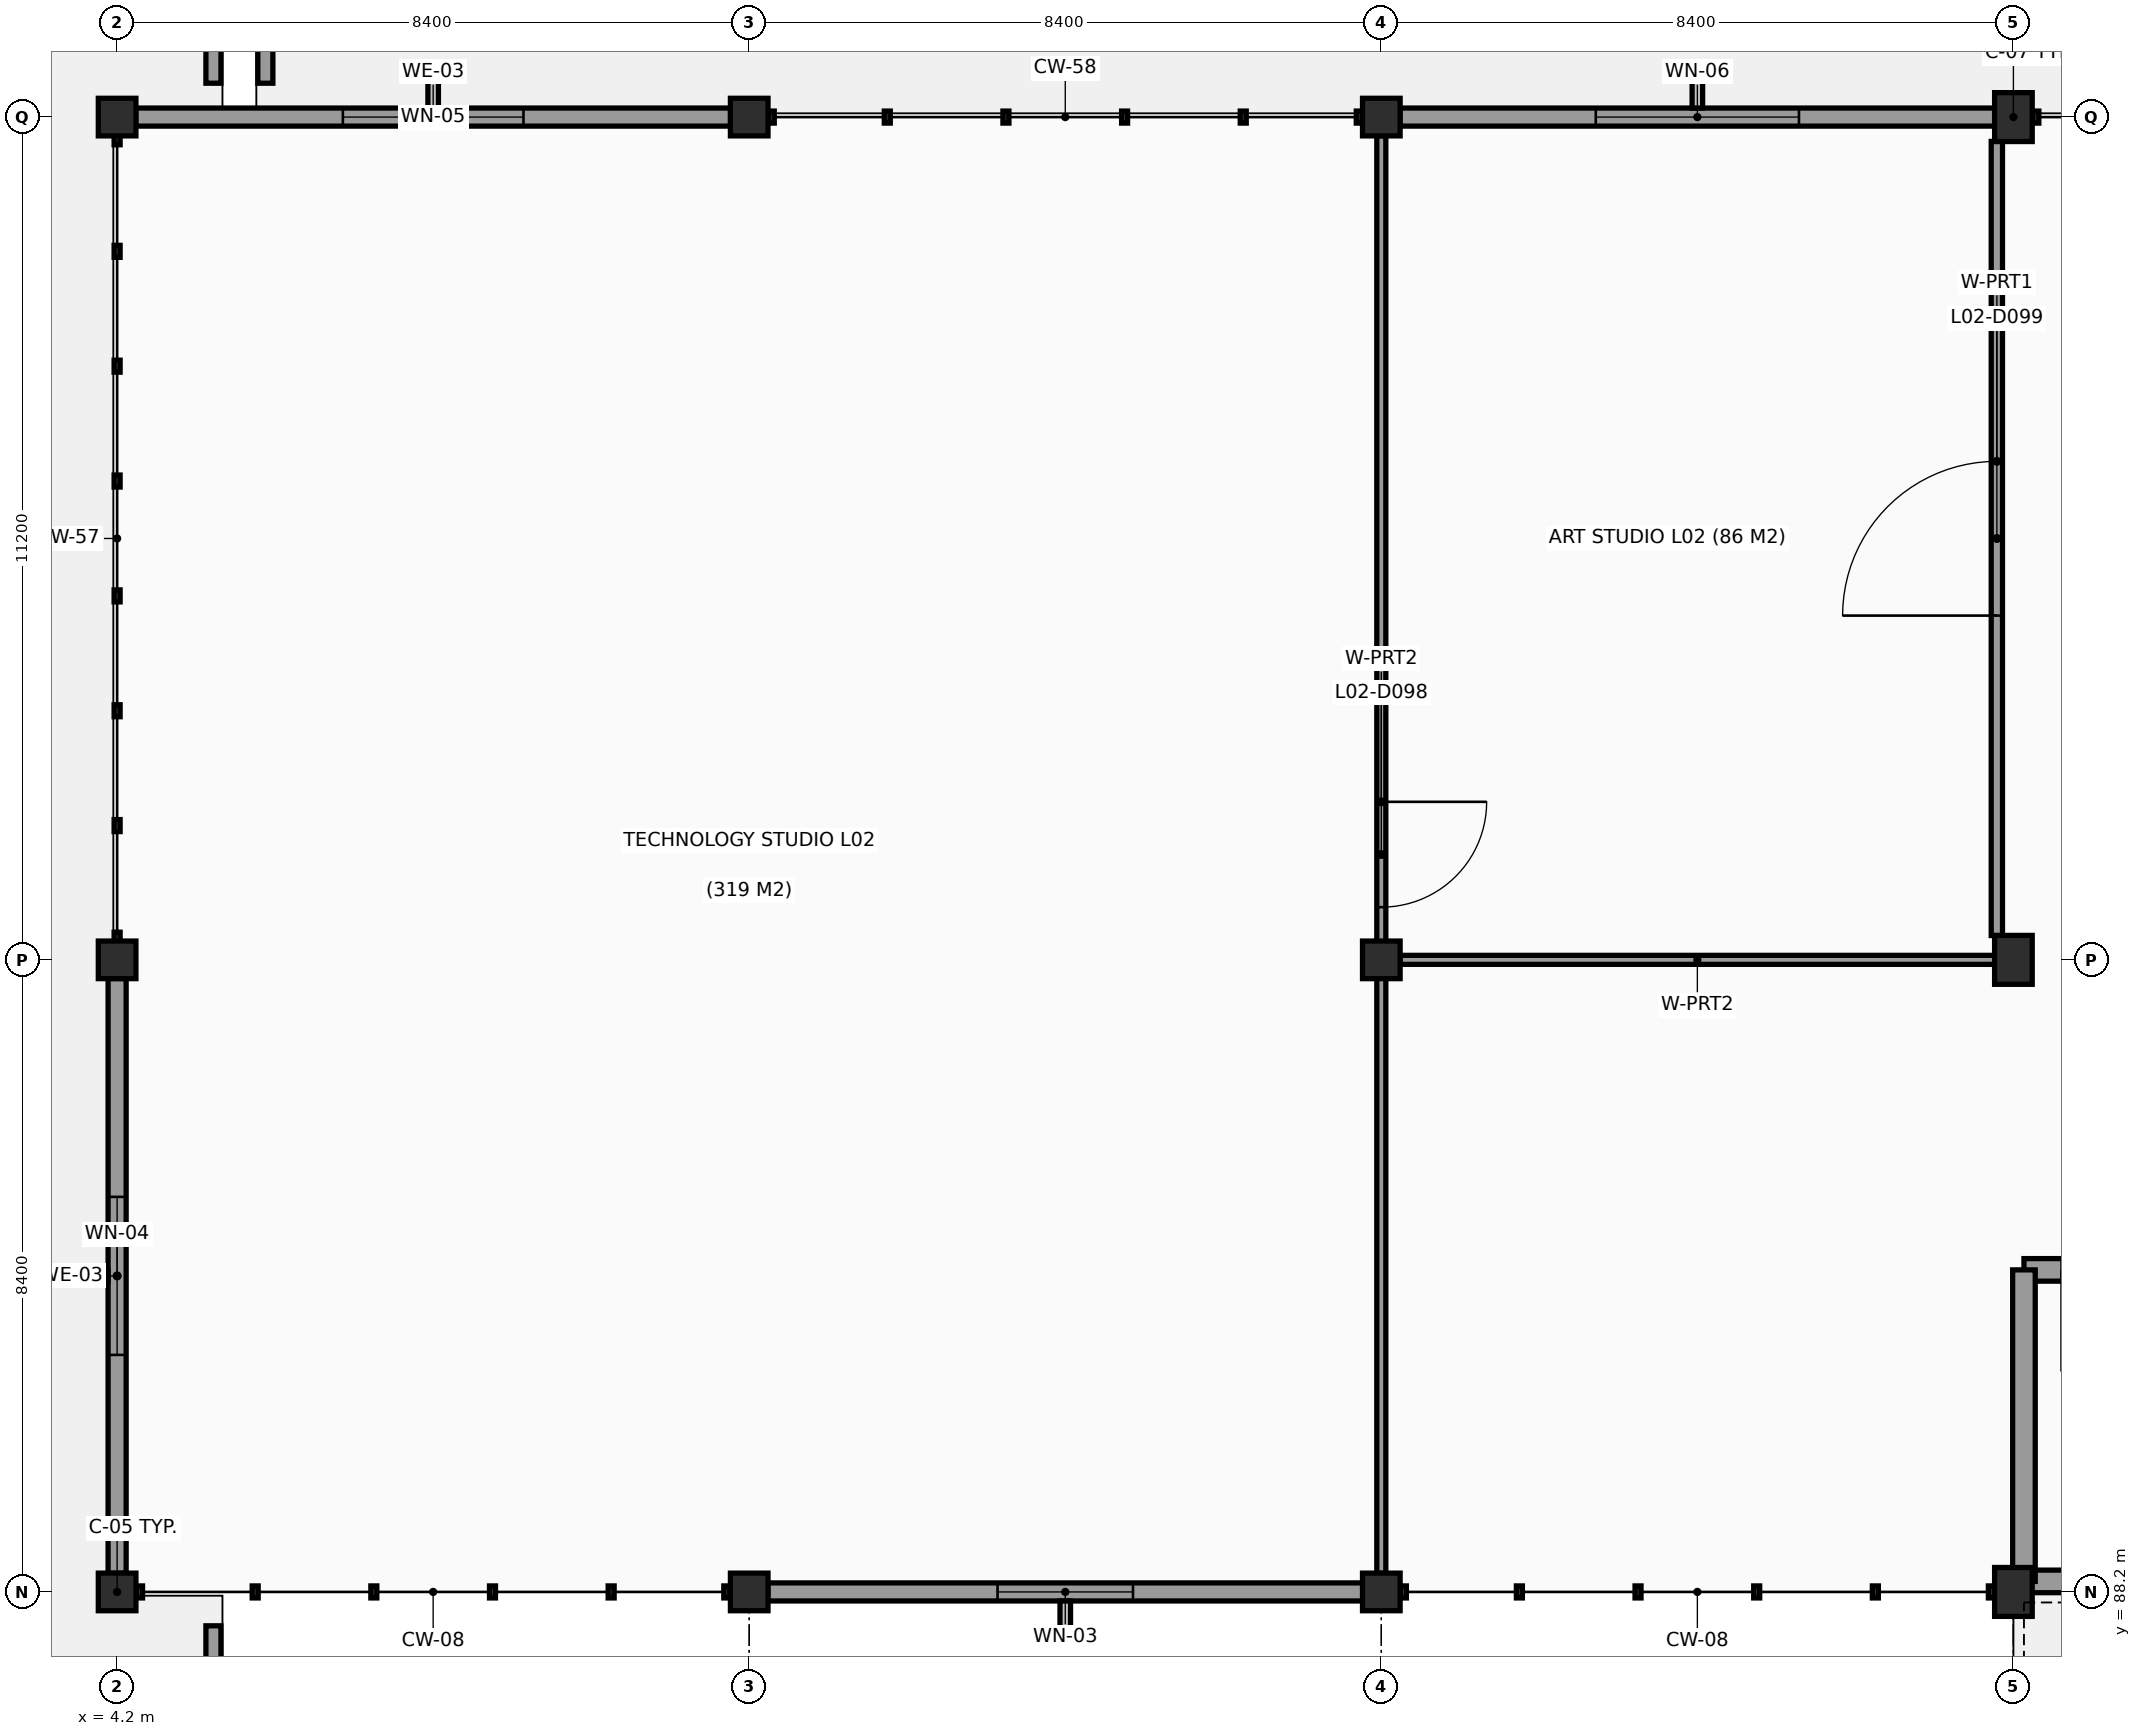
"""IFC4 building model, lengths in metres.
Left out: names, types, materials, properties, quantities, classifications, styles, units other than length and angle.
Written with IfcOpenShell. Run it as: python <this file> out.ifc"""

import sys

from ifc_helpers import new_model, si_unit, direction, frame, frame_2d, origin, origin_2d, place, context, subcontext, project, spatial, rectangle, extrude, element, fill, save


model = new_model("IFC4")
c1 = context("Model", 3, precision=1e-05, world=origin(), true_north=direction((0.0, 1.0)))
c2 = subcontext(c1, "Body", "Model", "MODEL_VIEW")
j1 = project(units=[si_unit("LENGTHUNIT", "METRE"), si_unit("PLANEANGLEUNIT", "RADIAN")], contexts=[c1])
p1 = place(None, origin())
s1 = spatial("IfcSite", under=j1, at=p1, CompositionType="ELEMENT")
p2 = place(p1, origin())
s2 = spatial("IfcBuilding", under=s1, at=p2, CompositionType="ELEMENT")
p3 = place(p2, frame((0.0, 0.0, 7.8)))
s3 = spatial("IfcBuildingStorey", under=s2, at=p3, CompositionType="ELEMENT", Elevation=7.8)
for number, where, z_axis, x_axis in (
    (1, (4.2, 88.2, 0.0), (0.0, 0.0, 1.0), (1.0, 0.0, 0.0)),
    (2, (4.2, 96.6, 0.0), (0.0, 0.0, 1.0), (1.0, 0.0, 0.0)),
):
    element("IfcColumn", number, at=place(p3, frame(where, z_axis=z_axis, x_axis=x_axis)), inside=s3, PredefinedType="COLUMN", context=c2, shape_type="SweptSolid", body=[
        extrude(rectangle(XDim=0.5, YDim=0.5, at=origin_2d()), origin(), (0.0, 0.0, 1.0), 3.34),
    ])
p4 = place(p3, frame((4.2, 107.8, 0.0), z_axis=(0.0, 0.0, 1.0), x_axis=(1.0, 0.0, 0.0)))
e3 = element("IfcColumn", 3, at=p4, inside=s3, PredefinedType="COLUMN", context=c2, shape_type="SweptSolid", body=[
    extrude(rectangle(XDim=0.5, YDim=0.5, at=origin_2d()), origin(), (0.0, 0.0, 1.0), 3.75),
])
p5 = place(p3, frame((12.6, 88.2, 0.0), z_axis=(0.0, 0.0, 1.0), x_axis=(1.0, 0.0, 0.0)))
e4 = element("IfcColumn", 4, at=p5, inside=s3, PredefinedType="COLUMN", context=c2, shape_type="SweptSolid", body=[
    extrude(rectangle(XDim=0.5, YDim=0.5, at=origin_2d()), origin(), (0.0, 0.0, 1.0), 3.34),
])
p6 = place(p3, frame((12.6, 107.8, 0.0), z_axis=(0.0, 0.0, 1.0), x_axis=(1.0, 0.0, 0.0)))
e5 = element("IfcColumn", 5, at=p6, inside=s3, PredefinedType="COLUMN", context=c2, shape_type="SweptSolid", body=[
    extrude(rectangle(XDim=0.5, YDim=0.5, at=origin_2d()), origin(), (0.0, 0.0, 1.0), 3.75),
])
for number, where, z_axis, x_axis in (
    (6, (21.0, 88.2, 0.0), (0.0, 0.0, 1.0), (1.0, 0.0, 0.0)),
    (7, (21.0, 96.6, 0.0), (0.0, 0.0, 1.0), (1.0, 0.0, 0.0)),
):
    element("IfcColumn", number, at=place(p3, frame(where, z_axis=z_axis, x_axis=x_axis)), inside=s3, PredefinedType="COLUMN", context=c2, shape_type="SweptSolid", body=[
        extrude(rectangle(XDim=0.5, YDim=0.5, at=origin_2d()), origin(), (0.0, 0.0, 1.0), 3.34),
    ])
p7 = place(p3, frame((21.0, 107.8, 0.0), z_axis=(0.0, 0.0, 1.0), x_axis=(1.0, 0.0, 0.0)))
e8 = element("IfcColumn", 8, at=p7, inside=s3, PredefinedType="COLUMN", context=c2, shape_type="SweptSolid", body=[
    extrude(rectangle(XDim=0.5, YDim=0.5, at=origin_2d()), origin(), (0.0, 0.0, 1.0), 3.75),
])
for number, where, z_axis, x_axis in (
    (9, (29.4, 88.2, 0.0), (0.0, 0.0, 1.0), (1.0, 0.0, 0.0)),
    (10, (29.4, 96.6, 0.0), (0.0, 0.0, 1.0), (1.0, 0.0, 0.0)),
):
    element("IfcColumn", number, at=place(p3, frame(where, z_axis=z_axis, x_axis=x_axis)), inside=s3, PredefinedType="COLUMN", context=c2, shape_type="SweptSolid", body=[
        extrude(rectangle(XDim=0.5, YDim=0.65, at=origin_2d()), origin(), (0.0, 0.0, 1.0), 3.34),
    ])
p8 = place(p3, frame((29.4, 107.8, 0.0), z_axis=(0.0, 0.0, 1.0), x_axis=(1.0, 0.0, 0.0)))
e11 = element("IfcColumn", 11, at=p8, inside=s3, PredefinedType="COLUMN", context=c2, shape_type="SweptSolid", body=[
    extrude(rectangle(XDim=0.5, YDim=0.65, at=origin_2d()), origin(), (0.0, 0.0, 1.0), 3.75),
])
p9 = place(p3, frame((20.752, 88.2, 0.0), z_axis=(0.0, 0.0, 1.0), x_axis=(-1.0, 0.0, 0.0)))
e12 = element("IfcWall", 12, at=p9, inside=s3, PredefinedType="SOLIDWALL", context=c2, shape_type="SweptSolid", body=[
    extrude(rectangle(XDim=7.904, YDim=0.24, at=frame_2d((3.952, 0.0))), origin(), (0.0, 0.0, 1.0), 3.2),
])
p10 = place(p9, frame((3.052, 0.0, 0.95)))
e13 = element("IfcOpeningElement", 13, at=p10, cuts=e12, PredefinedType="OPENING", context=c2, shape_type="SweptSolid", body=[
    extrude(rectangle(XDim=1.8, YDim=1.2, at=frame_2d((0.9, 0.6))), frame((0.0, 0.13, 0.0), z_axis=(0.0, -1.0, 0.0), x_axis=(1.0, 0.0, 0.0)), (0.0, 0.0, 1.0), 0.26),
])
p11 = place(p3, frame((4.2, 88.448, 0.0), z_axis=(0.0, 0.0, 1.0), x_axis=(0.0, 1.0, 0.0)))
e14 = element("IfcWall", 14, at=p11, inside=s3, PredefinedType="SOLIDWALL", context=c2, shape_type="SweptSolid", body=[
    extrude(rectangle(XDim=7.904, YDim=0.24, at=frame_2d((3.952, 0.0))), origin(), (0.0, 0.0, 1.0), 3.2),
])
p12 = place(p11, frame((2.902, 0.0, 0.95)))
e15 = element("IfcOpeningElement", 15, at=p12, cuts=e14, PredefinedType="OPENING", context=c2, shape_type="SweptSolid", body=[
    extrude(rectangle(XDim=2.1, YDim=1.2, at=frame_2d((1.05, 0.6))), frame((0.0, 0.13, 0.0), z_axis=(0.0, -1.0, 0.0), x_axis=(1.0, 0.0, 0.0)), (0.0, 0.0, 1.0), 0.26),
])
p13 = place(p3, frame((4.448, 107.8, 0.0), z_axis=(0.0, 0.0, 1.0), x_axis=(1.0, 0.0, 0.0)))
e16 = element("IfcWall", 16, at=p13, inside=s3, PredefinedType="SOLIDWALL", context=c2, shape_type="SweptSolid", body=[
    extrude(rectangle(XDim=7.904, YDim=0.24, at=frame_2d((3.952, 0.0))), origin(), (0.0, 0.0, 1.0), 3.34),
])
p14 = place(p13, frame((2.752, 0.0, 0.95)))
e17 = element("IfcOpeningElement", 17, at=p14, cuts=e16, PredefinedType="OPENING", context=c2, shape_type="SweptSolid", body=[
    extrude(rectangle(XDim=2.4, YDim=1.2, at=frame_2d((1.2, 0.6))), frame((0.0, 0.13, 0.0), z_axis=(0.0, -1.0, 0.0), x_axis=(1.0, 0.0, 0.0)), (0.0, 0.0, 1.0), 0.26),
])
p15 = place(p3, frame((21.248, 107.8, 0.0), z_axis=(0.0, 0.0, 1.0), x_axis=(1.0, 0.0, 0.0)))
e18 = element("IfcWall", 18, at=p15, inside=s3, PredefinedType="SOLIDWALL", context=c2, shape_type="SweptSolid", body=[
    extrude(rectangle(XDim=7.904, YDim=0.24, at=frame_2d((3.952, 0.0))), origin(), (0.0, 0.0, 1.0), 3.34),
])
p16 = place(p15, frame((2.602, 0.0, 0.95)))
e19 = element("IfcOpeningElement", 19, at=p16, cuts=e18, PredefinedType="OPENING", context=c2, shape_type="SweptSolid", body=[
    extrude(rectangle(XDim=2.7, YDim=1.2, at=frame_2d((1.35, 0.6))), frame((0.0, 0.13, 0.0), z_axis=(0.0, -1.0, 0.0), x_axis=(1.0, 0.0, 0.0)), (0.0, 0.0, 1.0), 0.26),
])
for number, where, z_axis, x_axis in (
    (20, (6.17, 108.25, 0.0), (0.0, 0.0, 1.0), (0.0, 1.0, 0.0)),
    (21, (5.48, 111.88, 0.0), (0.0, 0.0, 1.0), (0.0, -1.0, 0.0)),
):
    element("IfcWall", number, at=place(p3, frame(where, z_axis=z_axis, x_axis=x_axis)), inside=s3, PredefinedType="PARAPET", context=c2, shape_type="SweptSolid", body=[
        extrude(rectangle(XDim=3.63, YDim=0.2, at=frame_2d((1.815, 0.0))), origin(), (0.0, 0.0, 1.0), 1.1),
    ])
p17 = place(p3, frame((5.48, 87.75, 0.0), z_axis=(0.0, 0.0, 1.0), x_axis=(0.0, -1.0, 0.0)))
e22 = element("IfcWall", 22, at=p17, inside=s3, PredefinedType="PARAPET", context=c2, shape_type="SweptSolid", body=[
    extrude(rectangle(XDim=66.3, YDim=0.2, at=frame_2d((33.15, 0.0))), origin(), (0.0, 0.0, 1.0), 1.1),
])
p18 = place(p3, frame((29.54, 88.34, 0.0), z_axis=(0.0, 0.0, 1.0), x_axis=(1.0, 0.0, 0.0)))
e23 = element("IfcWall", 23, at=p18, inside=s3, PredefinedType="SHEAR", context=c2, shape_type="SweptSolid", body=[
    extrude(rectangle(XDim=8.12, YDim=0.3, at=frame_2d((4.06, 0.0))), origin(), (0.0, 0.0, 1.0), 3.34),
])
p19 = place(p3, frame((37.66, 92.48, 0.0), z_axis=(0.0, 0.0, 1.0), x_axis=(-1.0, 0.0, 0.0)))
e24 = element("IfcWall", 24, at=p19, inside=s3, PredefinedType="SHEAR", context=c2, shape_type="SweptSolid", body=[
    extrude(rectangle(XDim=8.12, YDim=0.3, at=frame_2d((4.06, 0.0))), origin(), (0.0, 0.0, 1.0), 3.34),
])
p20 = place(p19, frame((6.27, 0.0, 0.0)))
e25 = element("IfcOpeningElement", 25, at=p20, cuts=e24, PredefinedType="OPENING", context=c2, shape_type="SweptSolid", body=[
    extrude(rectangle(XDim=1.35, YDim=2.15, at=frame_2d((0.675, 1.075))), frame((0.0, 0.16, 0.0), z_axis=(0.0, -1.0, 0.0), x_axis=(1.0, 0.0, 0.0)), (0.0, 0.0, 1.0), 0.32),
])
p21 = place(p3, frame((29.54, 92.48, 0.0), z_axis=(0.0, 0.0, 1.0), x_axis=(0.0, -1.0, 0.0)))
e26 = element("IfcWall", 26, at=p21, inside=s3, PredefinedType="SHEAR", context=c2, shape_type="SweptSolid", body=[
    extrude(rectangle(XDim=4.14, YDim=0.3, at=frame_2d((2.07, 0.0))), origin(), (0.0, 0.0, 1.0), 3.34),
])
p22 = place(p3, frame((21.0, 107.552, 0.0), z_axis=(0.0, 0.0, 1.0), x_axis=(0.0, -1.0, 0.0)))
e27 = element("IfcWall", 27, at=p22, inside=s3, PredefinedType="PARTITIONING", context=c2, shape_type="SweptSolid", body=[
    extrude(rectangle(XDim=19.104, YDim=0.12, at=frame_2d((9.552, 0.0))), origin(), (0.0, 0.0, 1.0), 3.34),
])
p23 = place(p22, frame((8.852, 0.0, 0.0)))
e28 = element("IfcOpeningElement", 28, at=p23, cuts=e27, PredefinedType="OPENING", context=c2, shape_type="SweptSolid", body=[
    extrude(rectangle(XDim=1.4, YDim=2.2, at=frame_2d((0.7, 1.1))), frame((0.0, 0.07, 0.0), z_axis=(0.0, -1.0, 0.0), x_axis=(1.0, 0.0, 0.0)), (0.0, 0.0, 1.0), 0.14),
])
p24 = place(p3, frame((29.18, 107.477, 0.0), z_axis=(0.0, 0.0, 1.0), x_axis=(0.0, -1.0, 0.0)))
e29 = element("IfcWall", 29, at=p24, inside=s3, PredefinedType="PARTITIONING", context=c2, shape_type="SweptSolid", body=[
    extrude(rectangle(XDim=10.554, YDim=0.15, at=frame_2d((5.277, 0.0))), origin(), (0.0, 0.0, 1.0), 3.34),
])
p25 = place(p24, frame((4.252, 0.0, 0.0)))
e30 = element("IfcOpeningElement", 30, at=p25, cuts=e29, PredefinedType="OPENING", context=c2, shape_type="SweptSolid", body=[
    extrude(rectangle(XDim=2.05, YDim=2.35, at=frame_2d((1.025, 1.175))), frame((0.0, 0.085, 0.0), z_axis=(0.0, -1.0, 0.0), x_axis=(1.0, 0.0, 0.0)), (0.0, 0.0, 1.0), 0.17),
])
p26 = place(p3, frame((29.152, 96.6, 0.0), z_axis=(0.0, 0.0, 1.0), x_axis=(-1.0, 0.0, 0.0)))
e31 = element("IfcWall", 31, at=p26, inside=s3, PredefinedType="PARTITIONING", context=c2, shape_type="SweptSolid", body=[
    extrude(rectangle(XDim=7.904, YDim=0.12, at=frame_2d((3.952, 0.0))), origin(), (0.0, 0.0, 1.0), 3.34),
])
p27 = place(p10, origin())
e32 = element("IfcWindow", 32, at=p27, inside=s3, PartitioningType="SINGLE_PANEL", PredefinedType="WINDOW", context=c2, shape_type="SweptSolid", body=[
    extrude(rectangle(XDim=1.8, YDim=1.2, at=frame_2d((0.9, 0.6))), frame((0.0, 0.03, 0.0), z_axis=(0.0, -1.0, 0.0), x_axis=(1.0, 0.0, 0.0)), (0.0, 0.0, 1.0), 0.06),
])
fill(e13, e32)
p28 = place(p12, origin())
e33 = element("IfcWindow", 33, at=p28, inside=s3, PartitioningType="SINGLE_PANEL", PredefinedType="WINDOW", context=c2, shape_type="SweptSolid", body=[
    extrude(rectangle(XDim=2.1, YDim=1.2, at=frame_2d((1.05, 0.6))), frame((0.0, 0.03, 0.0), z_axis=(0.0, -1.0, 0.0), x_axis=(1.0, 0.0, 0.0)), (0.0, 0.0, 1.0), 0.06),
])
fill(e15, e33)
p29 = place(p14, origin())
e34 = element("IfcWindow", 34, at=p29, inside=s3, PartitioningType="SINGLE_PANEL", PredefinedType="WINDOW", context=c2, shape_type="SweptSolid", body=[
    extrude(rectangle(XDim=2.4, YDim=1.2, at=frame_2d((1.2, 0.6))), frame((0.0, 0.03, 0.0), z_axis=(0.0, -1.0, 0.0), x_axis=(1.0, 0.0, 0.0)), (0.0, 0.0, 1.0), 0.06),
])
fill(e17, e34)
p30 = place(p16, origin())
e35 = element("IfcWindow", 35, at=p30, inside=s3, PartitioningType="SINGLE_PANEL", PredefinedType="WINDOW", context=c2, shape_type="SweptSolid", body=[
    extrude(rectangle(XDim=2.7, YDim=1.2, at=frame_2d((1.35, 0.6))), frame((0.0, 0.03, 0.0), z_axis=(0.0, -1.0, 0.0), x_axis=(1.0, 0.0, 0.0)), (0.0, 0.0, 1.0), 0.06),
])
fill(e19, e35)
p31 = place(p20, frame((1.35, 0.0, 0.0), z_axis=(0.0, 0.0, 1.0), x_axis=(-1.0, 0.0, 0.0)))
e36 = element("IfcDoor", 36, at=p31, inside=s3, OperationType="SINGLE_SWING_RIGHT", PredefinedType="DOOR", context=c2, shape_type="SweptSolid", body=[
    extrude(rectangle(XDim=1.35, YDim=2.15, at=frame_2d((0.675, 1.075))), frame((0.0, 0.025, 0.0), z_axis=(0.0, -1.0, 0.0), x_axis=(1.0, 0.0, 0.0)), (0.0, 0.0, 1.0), 0.05),
])
fill(e25, e36)
p32 = place(p23, origin())
e37 = element("IfcDoor", 37, at=p32, inside=s3, OperationType="SINGLE_SWING_LEFT", PredefinedType="DOOR", context=c2, shape_type="SweptSolid", body=[
    extrude(rectangle(XDim=1.4, YDim=2.2, at=frame_2d((0.7, 1.1))), frame((0.0, 0.025, 0.0), z_axis=(0.0, -1.0, 0.0), x_axis=(1.0, 0.0, 0.0)), (0.0, 0.0, 1.0), 0.05),
])
fill(e28, e37)
p33 = place(p25, origin())
e38 = element("IfcDoor", 38, at=p33, inside=s3, OperationType="DOUBLE_DOOR_SINGLE_SWING", PredefinedType="DOOR", context=c2, shape_type="SweptSolid", body=[
    extrude(rectangle(XDim=2.05, YDim=2.35, at=frame_2d((1.025, 1.175))), frame((0.0, 0.025, 0.0), z_axis=(0.0, -1.0, 0.0), x_axis=(1.0, 0.0, 0.0)), (0.0, 0.0, 1.0), 0.05),
])
fill(e30, e38)
save(model, sys.argv[1])
